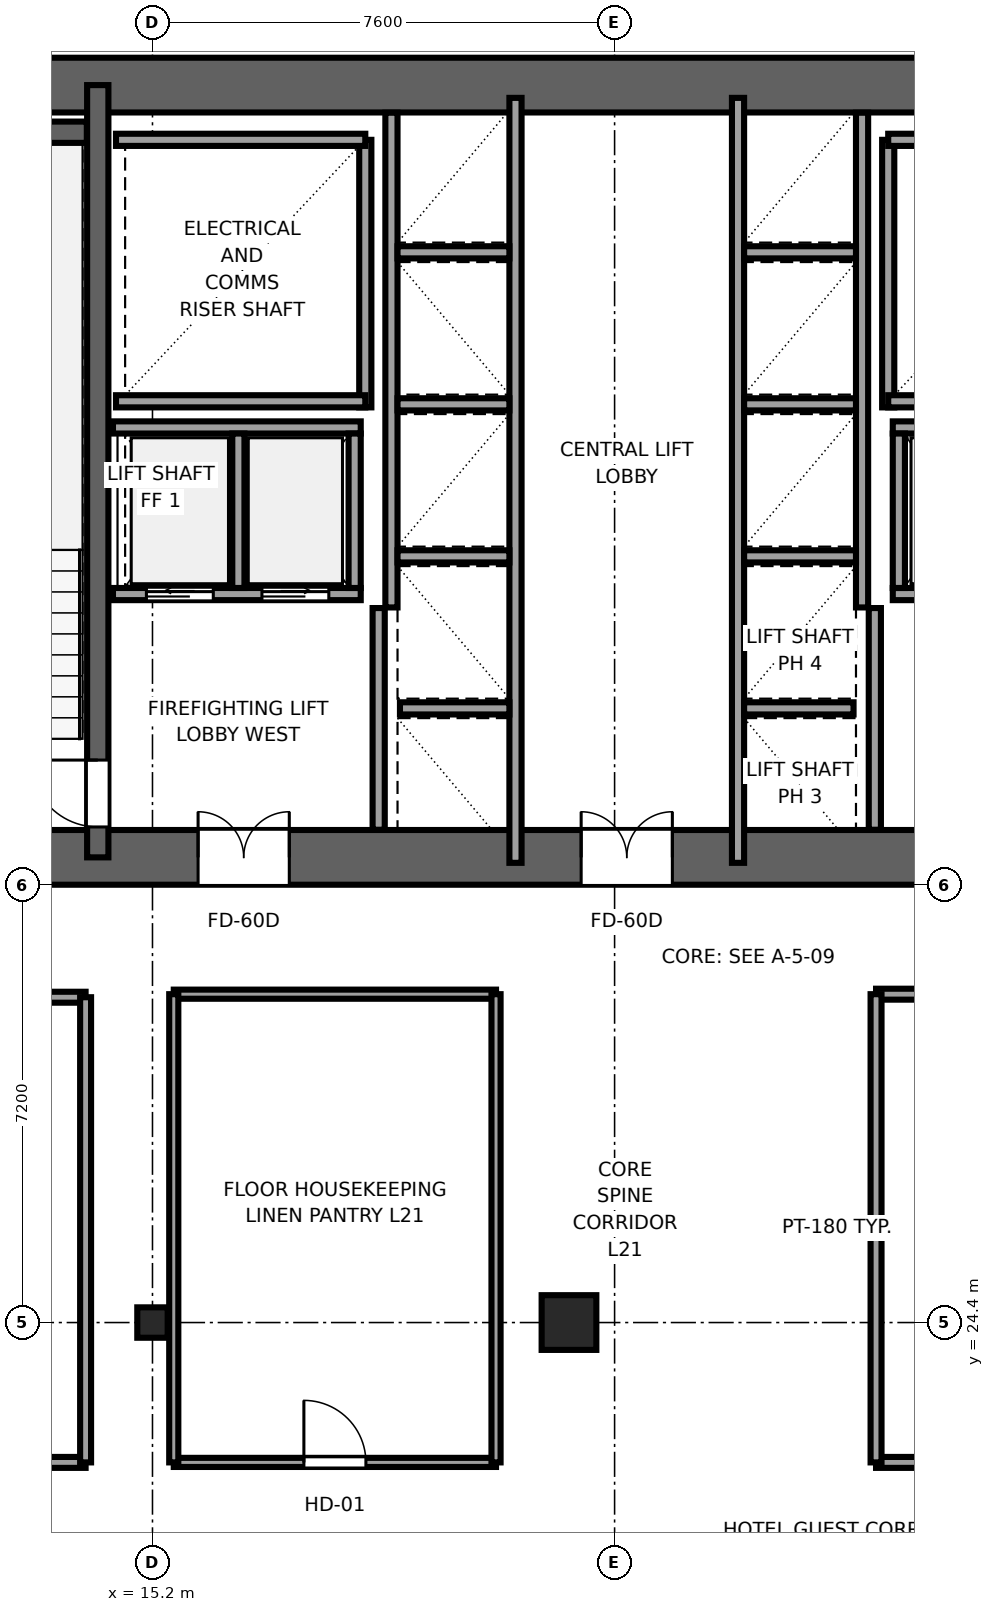
"""IFC4 building model, lengths in metres.
Left out: names, types, materials, properties, quantities, classifications, styles, units other than length and angle.
Written with IfcOpenShell. Run it as: python <this file> out.ifc"""

import sys

from ifc_helpers import new_model, si_unit, direction, frame, frame_2d, origin, origin_2d, place, context, subcontext, project, spatial, rectangle, i_section, extrude, source, transform, mapped, element, fill, save


model = new_model("IFC4")
c1 = context("Model", 3, precision=1e-05, world=origin(), true_north=direction((0.0, 1.0)))
c2 = subcontext(c1, "Body", "Model", "MODEL_VIEW")
j1 = project(units=[si_unit("LENGTHUNIT", "METRE"), si_unit("PLANEANGLEUNIT", "RADIAN")], contexts=[c1])
p1 = place(None, origin())
s1 = spatial("IfcSite", under=j1, at=p1, CompositionType="ELEMENT")
p2 = place(p1, origin())
s2 = spatial("IfcBuilding", under=s1, at=p2, CompositionType="ELEMENT")
p3 = place(p2, frame((0.0, 0.0, 85.25)))
s3 = spatial("IfcBuildingStorey", under=s2, at=p3, CompositionType="ELEMENT", Elevation=85.25)
p4 = place(p3, frame((9.6, 32.05, 0.0), z_axis=(0.0, 0.0, 1.0), x_axis=(1.0, 0.0, 0.0)))
e1 = element("IfcWall", 1, at=p4, inside=s3, PredefinedType="SHEAR", context=c2, shape_type="SweptSolid", body=[
    extrude(rectangle(XDim=26.8, YDim=0.9, at=frame_2d((13.4, 0.0))), origin(), (0.0, 0.0, 1.0), 3.55),
])
p5 = place(p4, frame((7.85, 0.0, 0.0), z_axis=(0.0, 0.0, 1.0), x_axis=(-1.0, 0.0, 0.0)))
e2 = element("IfcOpeningElement", 2, at=p5, cuts=e1, PredefinedType="OPENING", context=c2, shape_type="SweptSolid", body=[
    extrude(rectangle(XDim=1.5, YDim=2.04, at=frame_2d((0.75, 1.02))), frame((0.0, 0.46, 0.0), z_axis=(0.0, -1.0, 0.0), x_axis=(1.0, 0.0, 0.0)), (0.0, 0.0, 1.0), 0.92),
])
p6 = place(p4, frame((14.15, 0.0, 0.0), z_axis=(0.0, 0.0, 1.0), x_axis=(-1.0, 0.0, 0.0)))
e3 = element("IfcOpeningElement", 3, at=p6, cuts=e1, PredefinedType="OPENING", context=c2, shape_type="SweptSolid", body=[
    extrude(rectangle(XDim=1.5, YDim=2.04, at=frame_2d((0.75, 1.02))), frame((0.0, 0.46, 0.0), z_axis=(0.0, -1.0, 0.0), x_axis=(1.0, 0.0, 0.0)), (0.0, 0.0, 1.0), 0.92),
])
p7 = place(p4, frame((20.45, 0.0, 0.0), z_axis=(0.0, 0.0, 1.0), x_axis=(-1.0, 0.0, 0.0)))
e4 = element("IfcOpeningElement", 4, at=p7, cuts=e1, PredefinedType="OPENING", context=c2, shape_type="SweptSolid", body=[
    extrude(rectangle(XDim=1.5, YDim=2.04, at=frame_2d((0.75, 1.02))), frame((0.0, 0.46, 0.0), z_axis=(0.0, -1.0, 0.0), x_axis=(1.0, 0.0, 0.0)), (0.0, 0.0, 1.0), 0.92),
])
p8 = place(p3, frame((9.6, 44.75, 0.0), z_axis=(0.0, 0.0, 1.0), x_axis=(1.0, 0.0, 0.0)))
e5 = element("IfcWall", 5, at=p8, inside=s3, PredefinedType="SHEAR", context=c2, shape_type="SweptSolid", body=[
    extrude(rectangle(XDim=26.8, YDim=0.9, at=frame_2d((13.4, 0.0))), origin(), (0.0, 0.0, 1.0), 3.55),
])
p9 = place(p3, frame((14.3, 32.05, 0.0), z_axis=(0.0, 0.0, 1.0), x_axis=(0.0, 1.0, 0.0)))
e6 = element("IfcWall", 6, at=p9, inside=s3, PredefinedType="SHEAR", context=c2, shape_type="SweptSolid", body=[
    extrude(rectangle(XDim=12.7, YDim=0.35, at=frame_2d((6.35, 0.0))), origin(), (0.0, 0.0, 1.0), 3.55),
])
p10 = place(p9, frame((0.5, 0.0, 0.0)))
e7 = element("IfcOpeningElement", 7, at=p10, cuts=e6, PredefinedType="OPENING", context=c2, shape_type="SweptSolid", body=[
    extrude(rectangle(XDim=1.1, YDim=2.12, at=frame_2d((0.55, 1.06))), frame((0.0, 0.185, 0.0), z_axis=(0.0, -1.0, 0.0), x_axis=(1.0, 0.0, 0.0)), (0.0, 0.0, 1.0), 0.37),
])
p11 = place(p3, frame((10.52, 43.975, 0.0), z_axis=(0.0, 0.0, 1.0), x_axis=(1.0, 0.0, 0.0)))
e8 = element("IfcWall", 8, at=p11, inside=s3, PredefinedType="SHEAR", context=c2, shape_type="SweptSolid", body=[
    extrude(rectangle(XDim=3.6, YDim=0.35, at=frame_2d((1.8, 0.0))), origin(), (0.0, 0.0, 1.0), 3.55),
])
m1 = source(origin(), c2, "Body", "SweptSolid", [
    extrude(i_section(OverallWidth=0.5, OverallDepth=0.5, WebThickness=0.022, FlangeThickness=0.034, at=origin_2d()), origin(), (0.0, 0.0, 1.0), 3.55),
])
p12 = place(p3, frame((15.2, 24.4, 0.0), z_axis=(0.0, 0.0, 1.0), x_axis=(1.0, 0.0, 0.0)))
e9 = element("IfcColumn", 9, at=p12, inside=s3, PredefinedType="COLUMN", context=c2, shape_type="MappedRepresentation", body=[
    mapped(m1, transform((0.0, 0.0, 0.0), x_axis=(1.0, 0.0, 0.0), y_axis=(0.0, 1.0, 0.0), z_axis=(0.0, 0.0, 1.0), scale=1.0)),
])
m2 = source(origin(), c2, "Body", "SweptSolid", [
    extrude(rectangle(XDim=0.9, YDim=0.9, at=origin_2d()), origin(), (0.0, 0.0, 1.0), 3.55),
])
p13 = place(p3, frame((22.05, 24.4, 0.0), z_axis=(0.0, 0.0, 1.0), x_axis=(1.0, 0.0, 0.0)))
e10 = element("IfcColumn", 10, at=p13, inside=s3, PredefinedType="COLUMN", context=c2, shape_type="MappedRepresentation", body=[
    mapped(m2, transform((0.0, 0.0, 0.0), x_axis=(1.0, 0.0, 0.0), y_axis=(0.0, 1.0, 0.0), z_axis=(0.0, 0.0, 1.0), scale=1.0)),
])
p14 = place(p3, frame((18.7, 39.45, 0.0), z_axis=(0.0, 0.0, 1.0), x_axis=(0.0, 1.0, 0.0)))
e11 = element("IfcWall", 11, at=p14, inside=s3, PredefinedType="SOLIDWALL", context=c2, shape_type="SweptSolid", body=[
    extrude(rectangle(XDim=4.4, YDim=0.2, at=frame_2d((2.2, 0.0))), origin(), (0.0, 0.0, 1.0), 3.37),
])
for number, where, z_axis, x_axis in (
    (12, (14.6, 39.55, 0.0), (0.0, 0.0, 1.0), (1.0, 0.0, 0.0)),
    (13, (14.6, 43.85, 0.0), (0.0, 0.0, 1.0), (1.0, 0.0, 0.0)),
):
    element("IfcWall", number, at=place(p3, frame(where, z_axis=z_axis, x_axis=x_axis)), inside=s3, PredefinedType="SOLIDWALL", context=c2, shape_type="SweptSolid", body=[
        extrude(rectangle(XDim=4.1, YDim=0.2, at=frame_2d((2.05, 0.0))), origin(), (0.0, 0.0, 1.0), 3.37),
    ])
p15 = place(p3, frame((27.3, 39.45, 0.0), z_axis=(0.0, 0.0, 1.0), x_axis=(0.0, 1.0, 0.0)))
e14 = element("IfcWall", 14, at=p15, inside=s3, PredefinedType="SOLIDWALL", context=c2, shape_type="SweptSolid", body=[
    extrude(rectangle(XDim=4.4, YDim=0.2, at=frame_2d((2.2, 0.0))), origin(), (0.0, 0.0, 1.0), 3.37),
])
for number, where, z_axis, x_axis in (
    (15, (27.3, 39.55, 0.0), (0.0, 0.0, 1.0), (1.0, 0.0, 0.0)),
    (16, (27.3, 43.85, 0.0), (0.0, 0.0, 1.0), (1.0, 0.0, 0.0)),
):
    element("IfcWall", number, at=place(p3, frame(where, z_axis=z_axis, x_axis=x_axis)), inside=s3, PredefinedType="SOLIDWALL", context=c2, shape_type="SweptSolid", body=[
        extrude(rectangle(XDim=4.1, YDim=0.2, at=frame_2d((2.05, 0.0))), origin(), (0.0, 0.0, 1.0), 3.37),
    ])
for number, where, z_axis, x_axis in (
    (17, (18.92, 32.504, 0.0), (0.0, 0.0, 1.0), (0.0, 1.0, 0.0)),
    (18, (27.08, 32.504, 0.0), (0.0, 0.0, 1.0), (0.0, 1.0, 0.0)),
):
    element("IfcWall", number, at=place(p3, frame(where, z_axis=z_axis, x_axis=x_axis)), inside=s3, PredefinedType="SOLIDWALL", context=c2, shape_type="SweptSolid", body=[
        extrude(rectangle(XDim=3.646, YDim=0.2, at=frame_2d((1.823, 0.0))), origin(), (0.0, 0.0, 1.0), 3.37),
    ])
p16 = place(p3, frame((21.17, 31.96, 0.0), z_axis=(0.0, 0.0, 1.0), x_axis=(0.0, 1.0, 0.0)))
e19 = element("IfcWall", 19, at=p16, inside=s3, PredefinedType="SOLIDWALL", context=c2, shape_type="SweptSolid", body=[
    extrude(rectangle(XDim=12.58, YDim=0.2, at=frame_2d((6.29, 0.0))), origin(), (0.0, 0.0, 1.0), 3.37),
])
p17 = place(p3, frame((19.13, 36.16, 0.0), z_axis=(0.0, 0.0, 1.0), x_axis=(0.0, 1.0, 0.0)))
e20 = element("IfcWall", 20, at=p17, inside=s3, PredefinedType="SOLIDWALL", context=c2, shape_type="SweptSolid", body=[
    extrude(rectangle(XDim=8.136, YDim=0.2, at=frame_2d((4.068, 0.0))), origin(), (0.0, 0.0, 1.0), 3.37),
])
p18 = place(p3, frame((19.27, 34.5, 0.0), z_axis=(0.0, 0.0, 1.0), x_axis=(1.0, 0.0, 0.0)))
e21 = element("IfcWall", 21, at=p18, inside=s3, PredefinedType="SOLIDWALL", context=c2, shape_type="SweptSolid", body=[
    extrude(rectangle(XDim=1.8, YDim=0.2, at=frame_2d((0.9, 0.0))), origin(), (0.0, 0.0, 1.0), 3.37),
])
for number, where, z_axis, x_axis in (
    (22, (19.23, 37.0, 0.0), (0.0, 0.0, 1.0), (1.0, 0.0, 0.0)),
    (23, (19.23, 39.5, 0.0), (0.0, 0.0, 1.0), (1.0, 0.0, 0.0)),
    (24, (19.23, 42.0, 0.0), (0.0, 0.0, 1.0), (1.0, 0.0, 0.0)),
):
    element("IfcWall", number, at=place(p3, frame(where, z_axis=z_axis, x_axis=x_axis)), inside=s3, PredefinedType="SOLIDWALL", context=c2, shape_type="SweptSolid", body=[
        extrude(rectangle(XDim=1.84, YDim=0.2, at=frame_2d((0.92, 0.0))), origin(), (0.0, 0.0, 1.0), 3.37),
    ])
p19 = place(p3, frame((27.375, 36.38, 0.0), z_axis=(0.0, 0.0, 1.0), x_axis=(1.0, 0.0, 0.0)))
e25 = element("IfcWall", 25, at=p19, inside=s3, PredefinedType="SOLIDWALL", context=c2, shape_type="SweptSolid", body=[
    extrude(rectangle(XDim=4.075, YDim=0.2, at=frame_2d((2.038, 0.0))), origin(), (0.0, 0.0, 1.0), 3.37),
])
p20 = place(p19, frame((0.525, 0.0, 0.0)))
e26 = element("IfcOpeningElement", 26, at=p20, cuts=e25, PredefinedType="OPENING", context=c2, shape_type="SweptSolid", body=[
    extrude(rectangle(XDim=1.1, YDim=2.12, at=frame_2d((0.55, 1.06))), frame((0.0, 0.11, 0.0), z_axis=(0.0, -1.0, 0.0), x_axis=(1.0, 0.0, 0.0)), (0.0, 0.0, 1.0), 0.22),
])
p21 = place(p19, frame((2.425, 0.0, 0.0)))
e27 = element("IfcOpeningElement", 27, at=p21, cuts=e25, PredefinedType="OPENING", context=c2, shape_type="SweptSolid", body=[
    extrude(rectangle(XDim=1.1, YDim=2.12, at=frame_2d((0.55, 1.06))), frame((0.0, 0.11, 0.0), z_axis=(0.0, -1.0, 0.0), x_axis=(1.0, 0.0, 0.0)), (0.0, 0.0, 1.0), 0.22),
])
p22 = place(p3, frame((27.375, 39.12, 0.0), z_axis=(0.0, 0.0, 1.0), x_axis=(1.0, 0.0, 0.0)))
e28 = element("IfcWall", 28, at=p22, inside=s3, PredefinedType="SOLIDWALL", context=c2, shape_type="SweptSolid", body=[
    extrude(rectangle(XDim=4.075, YDim=0.2, at=frame_2d((2.038, 0.0))), origin(), (0.0, 0.0, 1.0), 3.37),
])
p23 = place(p3, frame((27.475, 36.48, 0.0), z_axis=(0.0, 0.0, 1.0), x_axis=(0.0, 1.0, 0.0)))
e29 = element("IfcWall", 29, at=p23, inside=s3, PredefinedType="SOLIDWALL", context=c2, shape_type="SweptSolid", body=[
    extrude(rectangle(XDim=2.54, YDim=0.2, at=frame_2d((1.27, 0.0))), origin(), (0.0, 0.0, 1.0), 3.37),
])
p24 = place(p3, frame((14.55, 36.38, 0.0), z_axis=(0.0, 0.0, 1.0), x_axis=(1.0, 0.0, 0.0)))
e30 = element("IfcWall", 30, at=p24, inside=s3, PredefinedType="SOLIDWALL", context=c2, shape_type="SweptSolid", body=[
    extrude(rectangle(XDim=4.075, YDim=0.2, at=frame_2d((2.038, 0.0))), origin(), (0.0, 0.0, 1.0), 3.37),
])
p25 = place(p24, frame((0.55, 0.0, 0.0)))
e31 = element("IfcOpeningElement", 31, at=p25, cuts=e30, PredefinedType="OPENING", context=c2, shape_type="SweptSolid", body=[
    extrude(rectangle(XDim=1.1, YDim=2.12, at=frame_2d((0.55, 1.06))), frame((0.0, 0.11, 0.0), z_axis=(0.0, -1.0, 0.0), x_axis=(1.0, 0.0, 0.0)), (0.0, 0.0, 1.0), 0.22),
])
p26 = place(p24, frame((2.45, 0.0, 0.0)))
e32 = element("IfcOpeningElement", 32, at=p26, cuts=e30, PredefinedType="OPENING", context=c2, shape_type="SweptSolid", body=[
    extrude(rectangle(XDim=1.1, YDim=2.12, at=frame_2d((0.55, 1.06))), frame((0.0, 0.11, 0.0), z_axis=(0.0, -1.0, 0.0), x_axis=(1.0, 0.0, 0.0)), (0.0, 0.0, 1.0), 0.22),
])
p27 = place(p3, frame((14.55, 39.12, 0.0), z_axis=(0.0, 0.0, 1.0), x_axis=(1.0, 0.0, 0.0)))
e33 = element("IfcWall", 33, at=p27, inside=s3, PredefinedType="SOLIDWALL", context=c2, shape_type="SweptSolid", body=[
    extrude(rectangle(XDim=4.075, YDim=0.2, at=frame_2d((2.038, 0.0))), origin(), (0.0, 0.0, 1.0), 3.37),
])
for number, where, z_axis, x_axis in (
    (34, (18.525, 36.48, 0.0), (0.0, 0.0, 1.0), (0.0, 1.0, 0.0)),
    (35, (16.613, 36.48, 0.0), (0.0, 0.0, 1.0), (0.0, 1.0, 0.0)),
):
    element("IfcWall", number, at=place(p3, frame(where, z_axis=z_axis, x_axis=x_axis)), inside=s3, PredefinedType="SOLIDWALL", context=c2, shape_type="SweptSolid", body=[
        extrude(rectangle(XDim=2.54, YDim=0.2, at=frame_2d((1.27, 0.0))), origin(), (0.0, 0.0, 1.0), 3.37),
    ])
p28 = place(p3, frame((24.83, 31.96, 0.0), z_axis=(0.0, 0.0, 1.0), x_axis=(0.0, 1.0, 0.0)))
e36 = element("IfcWall", 36, at=p28, inside=s3, PredefinedType="SOLIDWALL", context=c2, shape_type="SweptSolid", body=[
    extrude(rectangle(XDim=12.58, YDim=0.2, at=frame_2d((6.29, 0.0))), origin(), (0.0, 0.0, 1.0), 3.37),
])
p29 = place(p3, frame((26.87, 36.16, 0.0), z_axis=(0.0, 0.0, 1.0), x_axis=(0.0, 1.0, 0.0)))
e37 = element("IfcWall", 37, at=p29, inside=s3, PredefinedType="SOLIDWALL", context=c2, shape_type="SweptSolid", body=[
    extrude(rectangle(XDim=8.136, YDim=0.2, at=frame_2d((4.068, 0.0))), origin(), (0.0, 0.0, 1.0), 3.37),
])
p30 = place(p3, frame((24.93, 34.5, 0.0), z_axis=(0.0, 0.0, 1.0), x_axis=(1.0, 0.0, 0.0)))
e38 = element("IfcWall", 38, at=p30, inside=s3, PredefinedType="SOLIDWALL", context=c2, shape_type="SweptSolid", body=[
    extrude(rectangle(XDim=1.8, YDim=0.2, at=frame_2d((0.9, 0.0))), origin(), (0.0, 0.0, 1.0), 3.37),
])
for number, where, z_axis, x_axis in (
    (39, (24.93, 37.0, 0.0), (0.0, 0.0, 1.0), (1.0, 0.0, 0.0)),
    (40, (24.93, 39.5, 0.0), (0.0, 0.0, 1.0), (1.0, 0.0, 0.0)),
    (41, (24.93, 42.0, 0.0), (0.0, 0.0, 1.0), (1.0, 0.0, 0.0)),
):
    element("IfcWall", number, at=place(p3, frame(where, z_axis=z_axis, x_axis=x_axis)), inside=s3, PredefinedType="SOLIDWALL", context=c2, shape_type="SweptSolid", body=[
        extrude(rectangle(XDim=1.84, YDim=0.2, at=frame_2d((0.92, 0.0))), origin(), (0.0, 0.0, 1.0), 3.37),
    ])
p31 = place(p3, frame((9.88, 22.1, 0.0), z_axis=(0.0, 0.0, 1.0), x_axis=(1.0, 0.0, 0.0)))
e42 = element("IfcWall", 42, at=p31, inside=s3, PredefinedType="PARTITIONING", context=c2, shape_type="SweptSolid", body=[
    extrude(rectangle(XDim=4.22, YDim=0.18, at=frame_2d((2.11, 0.0))), origin(), (0.0, 0.0, 1.0), 3.37),
])
p32 = place(p31, frame((1.285, 0.0, 0.0)))
e43 = element("IfcOpeningElement", 43, at=p32, cuts=e42, PredefinedType="OPENING", context=c2, shape_type="SweptSolid", body=[
    extrude(rectangle(XDim=1.65, YDim=2.15, at=frame_2d((0.825, 1.075))), frame((0.0, 0.1, 0.0), z_axis=(0.0, -1.0, 0.0), x_axis=(1.0, 0.0, 0.0)), (0.0, 0.0, 1.0), 0.2),
])
p33 = place(p3, frame((9.88, 29.75, 0.0), z_axis=(0.0, 0.0, 1.0), x_axis=(1.0, 0.0, 0.0)))
e44 = element("IfcWall", 44, at=p33, inside=s3, PredefinedType="PARTITIONING", context=c2, shape_type="SweptSolid", body=[
    extrude(rectangle(XDim=4.22, YDim=0.18, at=frame_2d((2.11, 0.0))), origin(), (0.0, 0.0, 1.0), 3.37),
])
p34 = place(p3, frame((14.1, 22.1, 0.0), z_axis=(0.0, 0.0, 1.0), x_axis=(0.0, 1.0, 0.0)))
e45 = element("IfcWall", 45, at=p34, inside=s3, PredefinedType="PARTITIONING", context=c2, shape_type="SweptSolid", body=[
    extrude(rectangle(XDim=7.65, YDim=0.18, at=frame_2d((3.825, 0.0))), origin(), (0.0, 0.0, 1.0), 3.37),
])
p35 = place(p3, frame((27.1, 22.1, 0.0), z_axis=(0.0, 0.0, 1.0), x_axis=(1.0, 0.0, 0.0)))
e46 = element("IfcWall", 46, at=p35, inside=s3, PredefinedType="PARTITIONING", context=c2, shape_type="SweptSolid", body=[
    extrude(rectangle(XDim=7.3, YDim=0.18, at=frame_2d((3.65, 0.0))), origin(), (0.0, 0.0, 1.0), 3.37),
])
p36 = place(p35, frame((2.825, 0.0, 0.0)))
e47 = element("IfcOpeningElement", 47, at=p36, cuts=e46, PredefinedType="OPENING", context=c2, shape_type="SweptSolid", body=[
    extrude(rectangle(XDim=1.65, YDim=2.15, at=frame_2d((0.825, 1.075))), frame((0.0, 0.1, 0.0), z_axis=(0.0, -1.0, 0.0), x_axis=(1.0, 0.0, 0.0)), (0.0, 0.0, 1.0), 0.2),
])
p37 = place(p3, frame((27.1, 29.8, 0.0), z_axis=(0.0, 0.0, 1.0), x_axis=(1.0, 0.0, 0.0)))
e48 = element("IfcWall", 48, at=p37, inside=s3, PredefinedType="PARTITIONING", context=c2, shape_type="SweptSolid", body=[
    extrude(rectangle(XDim=7.3, YDim=0.18, at=frame_2d((3.65, 0.0))), origin(), (0.0, 0.0, 1.0), 3.37),
])
p38 = place(p3, frame((27.1, 22.1, 0.0), z_axis=(0.0, 0.0, 1.0), x_axis=(0.0, 1.0, 0.0)))
e49 = element("IfcWall", 49, at=p38, inside=s3, PredefinedType="PARTITIONING", context=c2, shape_type="SweptSolid", body=[
    extrude(rectangle(XDim=7.7, YDim=0.18, at=frame_2d((3.85, 0.0))), origin(), (0.0, 0.0, 1.0), 3.37),
])
p39 = place(p3, frame((15.55, 22.1, 0.0), z_axis=(0.0, 0.0, 1.0), x_axis=(1.0, 0.0, 0.0)))
e50 = element("IfcWall", 50, at=p39, inside=s3, PredefinedType="PARTITIONING", context=c2, shape_type="SweptSolid", body=[
    extrude(rectangle(XDim=5.3, YDim=0.15, at=frame_2d((2.65, 0.0))), origin(), (0.0, 0.0, 1.0), 3.37),
])
p40 = place(p39, frame((2.14, 0.0, 0.0)))
e51 = element("IfcOpeningElement", 51, at=p40, cuts=e50, PredefinedType="OPENING", context=c2, shape_type="SweptSolid", body=[
    extrude(rectangle(XDim=1.02, YDim=2.03, at=frame_2d((0.51, 1.015))), frame((0.0, 0.085, 0.0), z_axis=(0.0, -1.0, 0.0), x_axis=(1.0, 0.0, 0.0)), (0.0, 0.0, 1.0), 0.17),
])
p41 = place(p3, frame((15.55, 29.8, 0.0), z_axis=(0.0, 0.0, 1.0), x_axis=(1.0, 0.0, 0.0)))
e52 = element("IfcWall", 52, at=p41, inside=s3, PredefinedType="PARTITIONING", context=c2, shape_type="SweptSolid", body=[
    extrude(rectangle(XDim=5.3, YDim=0.15, at=frame_2d((2.65, 0.0))), origin(), (0.0, 0.0, 1.0), 3.37),
])
for number, where, z_axis, x_axis in (
    (53, (15.55, 22.1, 0.0), (0.0, 0.0, 1.0), (0.0, 1.0, 0.0)),
    (54, (20.85, 22.1, 0.0), (0.0, 0.0, 1.0), (0.0, 1.0, 0.0)),
):
    element("IfcWall", number, at=place(p3, frame(where, z_axis=z_axis, x_axis=x_axis)), inside=s3, PredefinedType="PARTITIONING", context=c2, shape_type="SweptSolid", body=[
        extrude(rectangle(XDim=7.7, YDim=0.15, at=frame_2d((3.85, 0.0))), origin(), (0.0, 0.0, 1.0), 3.37),
    ])
m3 = source(origin(), c2, "Body", "SweptSolid", [
    extrude(rectangle(XDim=1.1, YDim=2.12, at=frame_2d((0.55, 1.06))), frame((0.0, 0.025, 0.0), z_axis=(0.0, -1.0, 0.0), x_axis=(1.0, 0.0, 0.0)), (0.0, 0.0, 1.0), 0.05),
])
p42 = place(p10, origin())
e55 = element("IfcDoor", 55, at=p42, inside=s3, OperationType="SINGLE_SWING_RIGHT", PredefinedType="DOOR", context=c2, shape_type="MappedRepresentation", body=[
    mapped(m3, transform((0.0, 0.0, 0.0), x_axis=(1.0, 0.0, 0.0), y_axis=(0.0, 1.0, 0.0), z_axis=(0.0, 0.0, 1.0), scale=1.0)),
])
fill(e7, e55)
m4 = source(origin(), c2, "Body", "SweptSolid", [
    extrude(rectangle(XDim=1.5, YDim=2.04, at=frame_2d((0.75, 1.02))), frame((0.0, 0.025, 0.0), z_axis=(0.0, -1.0, 0.0), x_axis=(1.0, 0.0, 0.0)), (0.0, 0.0, 1.0), 0.05),
])
p43 = place(p5, origin())
e56 = element("IfcDoor", 56, at=p43, inside=s3, OperationType="DOUBLE_DOOR_SINGLE_SWING", PredefinedType="DOOR", context=c2, shape_type="MappedRepresentation", body=[
    mapped(m4, transform((0.0, 0.0, 0.0), x_axis=(1.0, 0.0, 0.0), y_axis=(0.0, 1.0, 0.0), z_axis=(0.0, 0.0, 1.0), scale=1.0)),
])
fill(e2, e56)
p44 = place(p6, origin())
e57 = element("IfcDoor", 57, at=p44, inside=s3, OperationType="DOUBLE_DOOR_SINGLE_SWING", PredefinedType="DOOR", context=c2, shape_type="MappedRepresentation", body=[
    mapped(m4, transform((0.0, 0.0, 0.0), x_axis=(1.0, 0.0, 0.0), y_axis=(0.0, 1.0, 0.0), z_axis=(0.0, 0.0, 1.0), scale=1.0)),
])
fill(e3, e57)
m5 = source(origin(), c2, "Body", "SweptSolid", [
    extrude(rectangle(XDim=1.1, YDim=2.12, at=frame_2d((0.55, 1.06))), frame((0.0, 0.025, 0.0), z_axis=(0.0, -1.0, 0.0), x_axis=(1.0, 0.0, 0.0)), (0.0, 0.0, 1.0), 0.05),
])
p45 = place(p25, origin())
e58 = element("IfcDoor", 58, at=p45, inside=s3, OperationType="SLIDING_TO_LEFT", PredefinedType="DOOR", context=c2, shape_type="MappedRepresentation", body=[
    mapped(m5, transform((0.0, 0.0, 0.0), x_axis=(1.0, 0.0, 0.0), y_axis=(0.0, 1.0, 0.0), z_axis=(0.0, 0.0, 1.0), scale=1.0)),
])
fill(e31, e58)
p46 = place(p26, origin())
e59 = element("IfcDoor", 59, at=p46, inside=s3, OperationType="SLIDING_TO_RIGHT", PredefinedType="DOOR", context=c2, shape_type="MappedRepresentation", body=[
    mapped(m5, transform((0.0, 0.0, 0.0), x_axis=(1.0, 0.0, 0.0), y_axis=(0.0, 1.0, 0.0), z_axis=(0.0, 0.0, 1.0), scale=1.0)),
])
fill(e32, e59)
m6 = source(origin(), c2, "Body", "SweptSolid", [
    extrude(rectangle(XDim=1.02, YDim=2.03, at=frame_2d((0.51, 1.015))), frame((0.0, 0.025, 0.0), z_axis=(0.0, -1.0, 0.0), x_axis=(1.0, 0.0, 0.0)), (0.0, 0.0, 1.0), 0.05),
])
p47 = place(p40, origin())
e60 = element("IfcDoor", 60, at=p47, inside=s3, OperationType="SINGLE_SWING_LEFT", PredefinedType="DOOR", context=c2, shape_type="MappedRepresentation", body=[
    mapped(m6, transform((0.0, 0.0, 0.0), x_axis=(1.0, 0.0, 0.0), y_axis=(0.0, 1.0, 0.0), z_axis=(0.0, 0.0, 1.0), scale=1.0)),
])
fill(e51, e60)
save(model, sys.argv[1])
